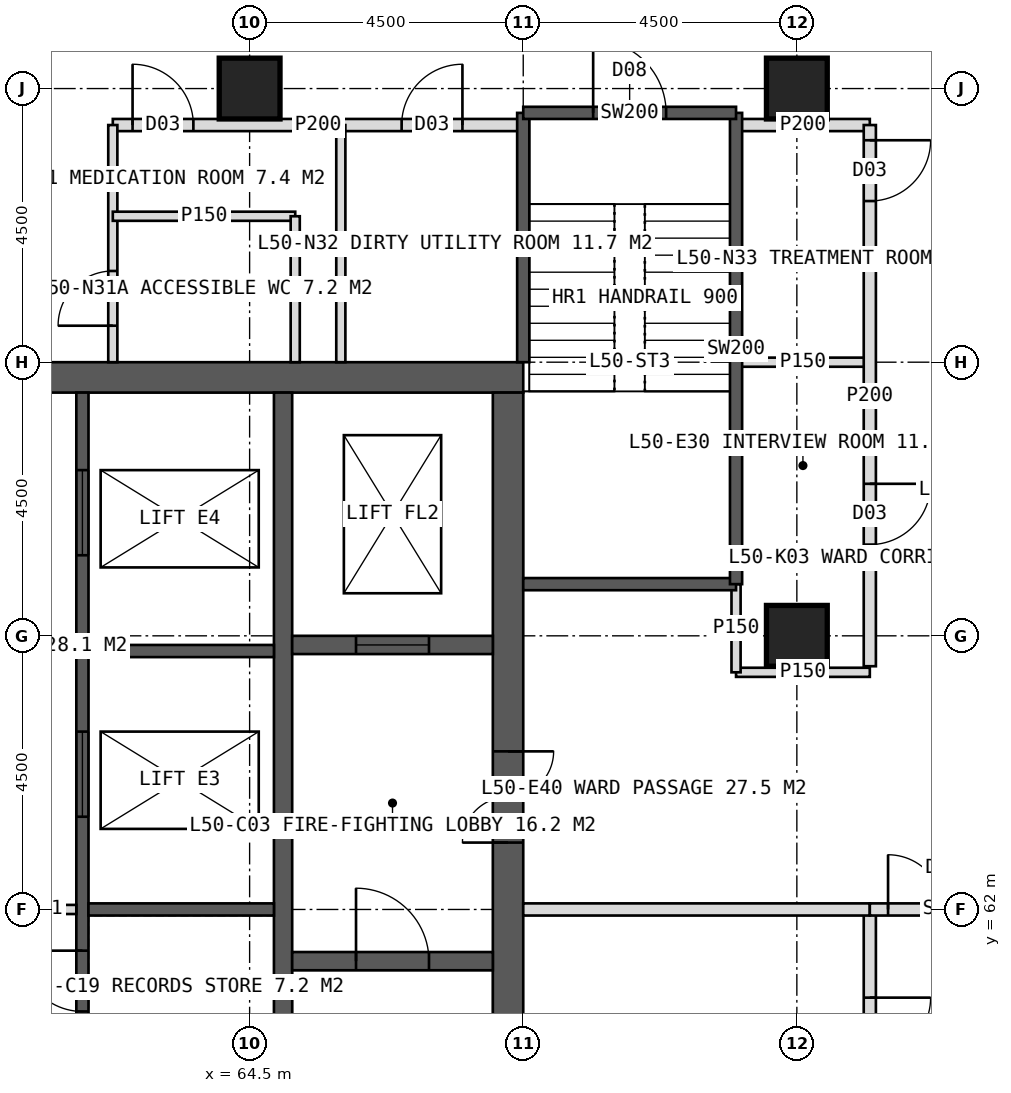
"""IFC4 building model, lengths in metres.
Left out: names, types, materials, properties, quantities, classifications, styles, units other than length and angle.
Written with IfcOpenShell. Run it as: python <this file> out.ifc"""

import sys

from ifc_helpers import new_model, si_unit, direction, frame, frame_2d, origin, origin_2d, place, context, subcontext, project, spatial, rectangle, hollow_rectangle, extrude, element, fill, save


model = new_model("IFC4")
c1 = context("Model", 3, precision=1e-05, world=origin(), true_north=direction((0.0, 1.0)))
c2 = subcontext(c1, "Body", "Model", "MODEL_VIEW")
j1 = project(units=[si_unit("LENGTHUNIT", "METRE"), si_unit("PLANEANGLEUNIT", "RADIAN")], contexts=[c1])
p1 = place(None, origin())
s1 = spatial("IfcSite", under=j1, at=p1, CompositionType="ELEMENT")
p2 = place(p1, origin())
s2 = spatial("IfcBuilding", under=s1, at=p2, CompositionType="ELEMENT")
p3 = place(p2, frame((0.0, 0.0, 209.0)))
s3 = spatial("IfcBuildingStorey", under=s2, at=p3, CompositionType="ELEMENT", Elevation=209.0)
p4 = place(p3, frame((51.0, 70.75, 0.0), z_axis=(0.0, 0.0, 1.0), x_axis=(1.0, 0.0, 0.0)))
e1 = element("IfcWall", 1, at=p4, inside=s3, PredefinedType="SHEAR", context=c2, shape_type="SweptSolid", body=[
    extrude(rectangle(XDim=18.0, YDim=0.5, at=frame_2d((9.0, 0.0))), origin(), (0.0, 0.0, 1.0), 4.0),
])
p5 = place(p4, frame((8.1, 0.0, 0.0)))
e2 = element("IfcOpeningElement", 2, at=p5, cuts=e1, PredefinedType="OPENING", context=c2, shape_type="SweptSolid", body=[
    extrude(rectangle(XDim=1.8, YDim=2.2, at=frame_2d((0.9, 1.1))), frame((0.0, 0.26, 0.0), z_axis=(0.0, -1.0, 0.0), x_axis=(1.0, 0.0, 0.0)), (0.0, 0.0, 1.0), 0.52),
])
p6 = place(p3, frame((68.75, 53.5, 0.0), z_axis=(0.0, 0.0, 1.0), x_axis=(0.0, 1.0, 0.0)))
e3 = element("IfcWall", 3, at=p6, inside=s3, PredefinedType="SHEAR", context=c2, shape_type="SweptSolid", body=[
    extrude(rectangle(XDim=17.0, YDim=0.5, at=frame_2d((8.5, 0.0))), origin(), (0.0, 0.0, 1.0), 4.0),
])
p7 = place(p6, frame((9.6, 0.0, 0.0)))
e4 = element("IfcOpeningElement", 4, at=p7, cuts=e3, PredefinedType="OPENING", context=c2, shape_type="SweptSolid", body=[
    extrude(rectangle(XDim=1.5, YDim=2.2, at=frame_2d((0.75, 1.1))), frame((0.0, 0.26, 0.0), z_axis=(0.0, -1.0, 0.0), x_axis=(1.0, 0.0, 0.0)), (0.0, 0.0, 1.0), 0.52),
])
p8 = place(p3, frame((65.05, 53.5, 0.0), z_axis=(0.0, 0.0, 1.0), x_axis=(0.0, 1.0, 0.0)))
e5 = element("IfcWall", 5, at=p8, inside=s3, PredefinedType="SHEAR", context=c2, shape_type="SweptSolid", body=[
    extrude(rectangle(XDim=17.0, YDim=0.3, at=frame_2d((8.5, 0.0))), origin(), (0.0, 0.0, 1.0), 4.0),
])
p9 = place(p3, frame((61.75, 53.5, 0.0), z_axis=(0.0, 0.0, 1.0), x_axis=(0.0, 1.0, 0.0)))
e6 = element("IfcWall", 6, at=p9, inside=s3, PredefinedType="SHEAR", context=c2, shape_type="SweptSolid", body=[
    extrude(rectangle(XDim=17.0, YDim=0.2, at=frame_2d((8.5, 0.0))), origin(), (0.0, 0.0, 1.0), 4.0),
])
p10 = place(p9, frame((0.808, 0.0, 0.0)))
e7 = element("IfcOpeningElement", 7, at=p10, cuts=e6, PredefinedType="OPENING", context=c2, shape_type="SweptSolid", body=[
    extrude(rectangle(XDim=1.0, YDim=2.1, at=frame_2d((0.5, 1.05))), frame((0.0, 0.11, 0.0), z_axis=(0.0, -1.0, 0.0), x_axis=(1.0, 0.0, 0.0)), (0.0, 0.0, 1.0), 0.22),
])
p11 = place(p9, frame((2.958, 0.0, 0.0)))
e8 = element("IfcOpeningElement", 8, at=p11, cuts=e6, PredefinedType="OPENING", context=c2, shape_type="SweptSolid", body=[
    extrude(rectangle(XDim=1.0, YDim=2.1, at=frame_2d((0.5, 1.05))), frame((0.0, 0.11, 0.0), z_axis=(0.0, -1.0, 0.0), x_axis=(1.0, 0.0, 0.0)), (0.0, 0.0, 1.0), 0.22),
])
p12 = place(p9, frame((4.722, 0.0, 0.0)))
e9 = element("IfcOpeningElement", 9, at=p12, cuts=e6, PredefinedType="OPENING", context=c2, shape_type="SweptSolid", body=[
    extrude(rectangle(XDim=1.0, YDim=2.1, at=frame_2d((0.5, 1.05))), frame((0.0, 0.11, 0.0), z_axis=(0.0, -1.0, 0.0), x_axis=(1.0, 0.0, 0.0)), (0.0, 0.0, 1.0), 0.22),
])
p13 = place(p9, frame((6.823, 0.0, 0.0)))
e10 = element("IfcOpeningElement", 10, at=p13, cuts=e6, PredefinedType="OPENING", context=c2, shape_type="SweptSolid", body=[
    extrude(rectangle(XDim=1.0, YDim=2.1, at=frame_2d((0.5, 1.05))), frame((0.0, 0.11, 0.0), z_axis=(0.0, -1.0, 0.0), x_axis=(1.0, 0.0, 0.0)), (0.0, 0.0, 1.0), 0.22),
])
p14 = place(p9, frame((10.025, 0.0, 0.0)))
e11 = element("IfcOpeningElement", 11, at=p14, cuts=e6, PredefinedType="OPENING", context=c2, shape_type="SweptSolid", body=[
    extrude(rectangle(XDim=1.4, YDim=2.2, at=frame_2d((0.7, 1.1))), frame((0.0, 0.11, 0.0), z_axis=(0.0, -1.0, 0.0), x_axis=(1.0, 0.0, 0.0)), (0.0, 0.0, 1.0), 0.22),
])
p15 = place(p9, frame((14.325, 0.0, 0.0)))
e12 = element("IfcOpeningElement", 12, at=p15, cuts=e6, PredefinedType="OPENING", context=c2, shape_type="SweptSolid", body=[
    extrude(rectangle(XDim=1.4, YDim=2.2, at=frame_2d((0.7, 1.1))), frame((0.0, 0.11, 0.0), z_axis=(0.0, -1.0, 0.0), x_axis=(1.0, 0.0, 0.0)), (0.0, 0.0, 1.0), 0.22),
])
for number, where, z_axis, x_axis in (
    (13, (61.85, 62.0, 0.0), (0.0, 0.0, 1.0), (1.0, 0.0, 0.0)),
    (14, (61.85, 66.25, 0.0), (0.0, 0.0, 1.0), (1.0, 0.0, 0.0)),
):
    element("IfcWall", number, at=place(p3, frame(where, z_axis=z_axis, x_axis=x_axis)), inside=s3, PredefinedType="SHEAR", context=c2, shape_type="SweptSolid", body=[
        extrude(rectangle(XDim=3.05, YDim=0.2, at=frame_2d((1.525, 0.0))), origin(), (0.0, 0.0, 1.0), 4.0),
    ])
p16 = place(p3, frame((65.2, 61.15, 0.0), z_axis=(0.0, 0.0, 1.0), x_axis=(1.0, 0.0, 0.0)))
e15 = element("IfcWall", 15, at=p16, inside=s3, PredefinedType="SHEAR", context=c2, shape_type="SweptSolid", body=[
    extrude(rectangle(XDim=3.3, YDim=0.3, at=frame_2d((1.65, 0.0))), origin(), (0.0, 0.0, 1.0), 4.0),
])
p17 = place(p16, frame((1.05, 0.0, 0.0)))
e16 = element("IfcOpeningElement", 16, at=p17, cuts=e15, PredefinedType="OPENING", context=c2, shape_type="SweptSolid", body=[
    extrude(rectangle(XDim=1.2, YDim=2.1, at=frame_2d((0.6, 1.05))), frame((0.0, 0.16, 0.0), z_axis=(0.0, -1.0, 0.0), x_axis=(1.0, 0.0, 0.0)), (0.0, 0.0, 1.0), 0.32),
])
p18 = place(p3, frame((65.2, 66.35, 0.0), z_axis=(0.0, 0.0, 1.0), x_axis=(1.0, 0.0, 0.0)))
e17 = element("IfcWall", 17, at=p18, inside=s3, PredefinedType="SHEAR", context=c2, shape_type="SweptSolid", body=[
    extrude(rectangle(XDim=3.3, YDim=0.3, at=frame_2d((1.65, 0.0))), origin(), (0.0, 0.0, 1.0), 4.0),
])
p19 = place(p18, frame((1.05, 0.0, 0.0)))
e18 = element("IfcOpeningElement", 18, at=p19, cuts=e17, PredefinedType="OPENING", context=c2, shape_type="SweptSolid", body=[
    extrude(rectangle(XDim=1.2, YDim=2.2, at=frame_2d((0.6, 1.1))), frame((0.0, 0.16, 0.0), z_axis=(0.0, -1.0, 0.0), x_axis=(1.0, 0.0, 0.0)), (0.0, 0.0, 1.0), 0.32),
])
for number, where, z_axis, x_axis in (
    (19, (73.5, 75.5, 0.0), (0.0, 0.0, 1.0), (1.0, 0.0, 0.0)),
    (20, (64.5, 75.5, 0.0), (0.0, 0.0, 1.0), (1.0, 0.0, 0.0)),
    (21, (73.5, 66.5, 0.0), (0.0, 0.0, 1.0), (1.0, 0.0, 0.0)),
):
    element("IfcColumn", number, at=place(p3, frame(where, z_axis=z_axis, x_axis=x_axis)), inside=s3, PredefinedType="COLUMN", context=c2, shape_type="SweptSolid", body=[
        extrude(hollow_rectangle(XDim=1.0, YDim=1.0, WallThickness=0.1, at=origin_2d()), origin(), (0.0, 0.0, 1.0), 4.0),
    ])
p20 = place(p3, frame((62.25, 74.9, 0.0), z_axis=(0.0, 0.0, 1.0), x_axis=(1.0, 0.0, 0.0)))
e22 = element("IfcWall", 22, at=p20, inside=s3, PredefinedType="PARTITIONING", context=c2, shape_type="SweptSolid", body=[
    extrude(rectangle(XDim=6.75, YDim=0.2, at=frame_2d((3.375, 0.0))), origin(), (0.0, 0.0, 1.0), 3.75),
])
p21 = place(p20, frame((0.325, 0.0, 0.0)))
e23 = element("IfcOpeningElement", 23, at=p21, cuts=e22, PredefinedType="OPENING", context=c2, shape_type="SweptSolid", body=[
    extrude(rectangle(XDim=1.0, YDim=2.1, at=frame_2d((0.5, 1.05))), frame((0.0, 0.11, 0.0), z_axis=(0.0, -1.0, 0.0), x_axis=(1.0, 0.0, 0.0)), (0.0, 0.0, 1.0), 0.22),
])
p22 = place(p20, frame((4.75, 0.0, 0.0)))
e24 = element("IfcOpeningElement", 24, at=p22, cuts=e22, PredefinedType="OPENING", context=c2, shape_type="SweptSolid", body=[
    extrude(rectangle(XDim=1.0, YDim=2.1, at=frame_2d((0.5, 1.05))), frame((0.0, 0.11, 0.0), z_axis=(0.0, -1.0, 0.0), x_axis=(1.0, 0.0, 0.0)), (0.0, 0.0, 1.0), 0.22),
])
p23 = place(p3, frame((72.5, 74.9, 0.0), z_axis=(0.0, 0.0, 1.0), x_axis=(1.0, 0.0, 0.0)))
e25 = element("IfcWall", 25, at=p23, inside=s3, PredefinedType="PARTITIONING", context=c2, shape_type="SweptSolid", body=[
    extrude(rectangle(XDim=2.2, YDim=0.2, at=frame_2d((1.1, 0.0))), origin(), (0.0, 0.0, 1.0), 3.75),
])
p24 = place(p3, frame((62.25, 71.0, 0.0), z_axis=(0.0, 0.0, 1.0), x_axis=(0.0, 1.0, 0.0)))
e26 = element("IfcWall", 26, at=p24, inside=s3, PredefinedType="PARTITIONING", context=c2, shape_type="SweptSolid", body=[
    extrude(rectangle(XDim=3.9, YDim=0.15, at=frame_2d((1.95, 0.0))), origin(), (0.0, 0.0, 1.0), 3.75),
])
p25 = place(p24, frame((0.6, 0.0, 0.0)))
e27 = element("IfcOpeningElement", 27, at=p25, cuts=e26, PredefinedType="OPENING", context=c2, shape_type="SweptSolid", body=[
    extrude(rectangle(XDim=0.9, YDim=2.1, at=frame_2d((0.45, 1.05))), frame((0.0, 0.085, 0.0), z_axis=(0.0, -1.0, 0.0), x_axis=(1.0, 0.0, 0.0)), (0.0, 0.0, 1.0), 0.17),
])
p26 = place(p3, frame((66.0, 71.0, 0.0), z_axis=(0.0, 0.0, 1.0), x_axis=(0.0, 1.0, 0.0)))
e28 = element("IfcWall", 28, at=p26, inside=s3, PredefinedType="PARTITIONING", context=c2, shape_type="SweptSolid", body=[
    extrude(rectangle(XDim=3.9, YDim=0.15, at=frame_2d((1.95, 0.0))), origin(), (0.0, 0.0, 1.0), 3.75),
])
p27 = place(p3, frame((62.25, 73.4, 0.0), z_axis=(0.0, 0.0, 1.0), x_axis=(1.0, 0.0, 0.0)))
e29 = element("IfcWall", 29, at=p27, inside=s3, PredefinedType="PARTITIONING", context=c2, shape_type="SweptSolid", body=[
    extrude(rectangle(XDim=3.0, YDim=0.15, at=frame_2d((1.5, 0.0))), origin(), (0.0, 0.0, 1.0), 3.75),
])
p28 = place(p3, frame((65.25, 71.0, 0.0), z_axis=(0.0, 0.0, 1.0), x_axis=(0.0, 1.0, 0.0)))
e30 = element("IfcWall", 30, at=p28, inside=s3, PredefinedType="PARTITIONING", context=c2, shape_type="SweptSolid", body=[
    extrude(rectangle(XDim=2.4, YDim=0.15, at=frame_2d((1.2, 0.0))), origin(), (0.0, 0.0, 1.0), 3.75),
])
p29 = place(p3, frame((72.5, 71.0, 0.0), z_axis=(0.0, 0.0, 1.0), x_axis=(1.0, 0.0, 0.0)))
e31 = element("IfcWall", 31, at=p29, inside=s3, PredefinedType="PARTITIONING", context=c2, shape_type="SweptSolid", body=[
    extrude(rectangle(XDim=2.2, YDim=0.15, at=frame_2d((1.1, 0.0))), origin(), (0.0, 0.0, 1.0), 3.75),
])
p30 = place(p3, frame((74.7, 74.9, 0.0), z_axis=(0.0, 0.0, 1.0), x_axis=(0.0, -1.0, 0.0)))
e32 = element("IfcWall", 32, at=p30, inside=s3, PredefinedType="PARTITIONING", context=c2, shape_type="SweptSolid", body=[
    extrude(rectangle(XDim=8.9, YDim=0.2, at=frame_2d((4.45, 0.0))), origin(), (0.0, 0.0, 1.0), 3.75),
])
p31 = place(p30, frame((0.25, 0.0, 0.0)))
e33 = element("IfcOpeningElement", 33, at=p31, cuts=e32, PredefinedType="OPENING", context=c2, shape_type="SweptSolid", body=[
    extrude(rectangle(XDim=1.0, YDim=2.1, at=frame_2d((0.5, 1.05))), frame((0.0, 0.11, 0.0), z_axis=(0.0, -1.0, 0.0), x_axis=(1.0, 0.0, 0.0)), (0.0, 0.0, 1.0), 0.22),
])
p32 = place(p30, frame((5.9, 0.0, 0.0)))
e34 = element("IfcOpeningElement", 34, at=p32, cuts=e32, PredefinedType="OPENING", context=c2, shape_type="SweptSolid", body=[
    extrude(rectangle(XDim=1.0, YDim=2.1, at=frame_2d((0.5, 1.05))), frame((0.0, 0.11, 0.0), z_axis=(0.0, -1.0, 0.0), x_axis=(1.0, 0.0, 0.0)), (0.0, 0.0, 1.0), 0.22),
])
p33 = place(p3, frame((74.7, 62.0, 0.0), z_axis=(0.0, 0.0, 1.0), x_axis=(0.0, -1.0, 0.0)))
e35 = element("IfcWall", 35, at=p33, inside=s3, PredefinedType="PARTITIONING", context=c2, shape_type="SweptSolid", body=[
    extrude(rectangle(XDim=14.7, YDim=0.2, at=frame_2d((7.35, 0.0))), origin(), (0.0, 0.0, 1.0), 3.75),
])
p34 = place(p33, frame((1.45, 0.0, 0.0)))
e36 = element("IfcOpeningElement", 36, at=p34, cuts=e35, PredefinedType="OPENING", context=c2, shape_type="SweptSolid", body=[
    extrude(rectangle(XDim=1.0, YDim=2.1, at=frame_2d((0.5, 1.05))), frame((0.0, 0.11, 0.0), z_axis=(0.0, -1.0, 0.0), x_axis=(1.0, 0.0, 0.0)), (0.0, 0.0, 1.0), 0.22),
])
p35 = place(p33, frame((11.35, 0.0, 0.0)))
e37 = element("IfcOpeningElement", 37, at=p35, cuts=e35, PredefinedType="OPENING", context=c2, shape_type="SweptSolid", body=[
    extrude(rectangle(XDim=1.0, YDim=2.1, at=frame_2d((0.5, 1.05))), frame((0.0, 0.11, 0.0), z_axis=(0.0, -1.0, 0.0), x_axis=(1.0, 0.0, 0.0)), (0.0, 0.0, 1.0), 0.22),
])
p36 = place(p3, frame((72.5, 65.9, 0.0), z_axis=(0.0, 0.0, 1.0), x_axis=(1.0, 0.0, 0.0)))
e38 = element("IfcWall", 38, at=p36, inside=s3, PredefinedType="PARTITIONING", context=c2, shape_type="SweptSolid", body=[
    extrude(rectangle(XDim=2.2, YDim=0.15, at=frame_2d((1.1, 0.0))), origin(), (0.0, 0.0, 1.0), 3.75),
])
p37 = place(p3, frame((69.0, 62.0, 0.0), z_axis=(0.0, 0.0, 1.0), x_axis=(1.0, 0.0, 0.0)))
e39 = element("IfcWall", 39, at=p37, inside=s3, PredefinedType="SOLIDWALL", context=c2, shape_type="SweptSolid", body=[
    extrude(rectangle(XDim=5.7, YDim=0.2, at=frame_2d((2.85, 0.0))), origin(), (0.0, 0.0, 1.0), 2.95),
])
p38 = place(p3, frame((74.7, 62.0, 0.0), z_axis=(0.0, 0.0, 1.0), x_axis=(1.0, 0.0, 0.0)))
e40 = element("IfcWall", 40, at=p38, inside=s3, PredefinedType="SOLIDWALL", context=c2, shape_type="SweptSolid", body=[
    extrude(rectangle(XDim=2.7, YDim=0.2, at=frame_2d((1.35, 0.0))), origin(), (0.0, 0.0, 1.0), 2.95),
])
p39 = place(p38, frame((0.3, 0.0, 0.0)))
e41 = element("IfcOpeningElement", 41, at=p39, cuts=e40, PredefinedType="OPENING", context=c2, shape_type="SweptSolid", body=[
    extrude(rectangle(XDim=1.8, YDim=2.2, at=frame_2d((0.9, 1.1))), frame((0.0, 0.11, 0.0), z_axis=(0.0, -1.0, 0.0), x_axis=(1.0, 0.0, 0.0)), (0.0, 0.0, 1.0), 0.22),
])
p40 = place(p3, frame((58.35, 62.0, 0.0), z_axis=(0.0, 0.0, 1.0), x_axis=(1.0, 0.0, 0.0)))
e42 = element("IfcWall", 42, at=p40, inside=s3, PredefinedType="PARTITIONING", context=c2, shape_type="SweptSolid", body=[
    extrude(rectangle(XDim=3.3, YDim=0.15, at=frame_2d((1.65, 0.0))), origin(), (0.0, 0.0, 1.0), 3.75),
])
p41 = place(p3, frame((72.5, 65.9, 0.0), z_axis=(0.0, 0.0, 1.0), x_axis=(0.0, 1.0, 0.0)))
e43 = element("IfcWall", 43, at=p41, inside=s3, PredefinedType="PARTITIONING", context=c2, shape_type="SweptSolid", body=[
    extrude(rectangle(XDim=1.45, YDim=0.15, at=frame_2d((0.725, 0.0))), origin(), (0.0, 0.0, 1.0), 3.75),
])
p42 = place(p3, frame((69.0, 71.0, 0.0), z_axis=(0.0, 0.0, 1.0), x_axis=(0.0, 1.0, 0.0)))
e44 = element("IfcWall", 44, at=p42, inside=s3, PredefinedType="SOLIDWALL", context=c2, shape_type="SweptSolid", body=[
    extrude(rectangle(XDim=4.1, YDim=0.2, at=frame_2d((2.05, 0.0))), origin(), (0.0, 0.0, 1.0), 3.75),
])
p43 = place(p3, frame((69.0, 67.35, 0.0), z_axis=(0.0, 0.0, 1.0), x_axis=(1.0, 0.0, 0.0)))
e45 = element("IfcWall", 45, at=p43, inside=s3, PredefinedType="SOLIDWALL", context=c2, shape_type="SweptSolid", body=[
    extrude(rectangle(XDim=3.5, YDim=0.2, at=frame_2d((1.75, 0.0))), origin(), (0.0, 0.0, 1.0), 3.75),
])
p44 = place(p3, frame((72.5, 67.35, 0.0), z_axis=(0.0, 0.0, 1.0), x_axis=(0.0, 1.0, 0.0)))
e46 = element("IfcWall", 46, at=p44, inside=s3, PredefinedType="SOLIDWALL", context=c2, shape_type="SweptSolid", body=[
    extrude(rectangle(XDim=7.75, YDim=0.2, at=frame_2d((3.875, 0.0))), origin(), (0.0, 0.0, 1.0), 3.75),
])
p45 = place(p3, frame((69.0, 75.1, 0.0), z_axis=(0.0, 0.0, 1.0), x_axis=(1.0, 0.0, 0.0)))
e47 = element("IfcWall", 47, at=p45, inside=s3, PredefinedType="SOLIDWALL", context=c2, shape_type="SweptSolid", body=[
    extrude(rectangle(XDim=3.5, YDim=0.2, at=frame_2d((1.75, 0.0))), origin(), (0.0, 0.0, 1.0), 3.75),
])
p46 = place(p45, frame((1.15, 0.0, 0.0)))
e48 = element("IfcOpeningElement", 48, at=p46, cuts=e47, PredefinedType="OPENING", context=c2, shape_type="SweptSolid", body=[
    extrude(rectangle(XDim=1.2, YDim=2.1, at=frame_2d((0.6, 1.05))), frame((0.0, 0.11, 0.0), z_axis=(0.0, -1.0, 0.0), x_axis=(1.0, 0.0, 0.0)), (0.0, 0.0, 1.0), 0.22),
])
p47 = place(p25, origin())
e49 = element("IfcDoor", 49, at=p47, inside=s3, OperationType="SINGLE_SWING_LEFT", PredefinedType="DOOR", context=c2, shape_type="SweptSolid", body=[
    extrude(rectangle(XDim=0.9, YDim=2.1, at=frame_2d((0.45, 1.05))), frame((0.0, 0.025, 0.0), z_axis=(0.0, -1.0, 0.0), x_axis=(1.0, 0.0, 0.0)), (0.0, 0.0, 1.0), 0.05),
])
fill(e27, e49)
p48 = place(p21, origin())
e50 = element("IfcDoor", 50, at=p48, inside=s3, OperationType="SINGLE_SWING_LEFT", PredefinedType="DOOR", context=c2, shape_type="SweptSolid", body=[
    extrude(rectangle(XDim=1.0, YDim=2.1, at=frame_2d((0.5, 1.05))), frame((0.0, 0.025, 0.0), z_axis=(0.0, -1.0, 0.0), x_axis=(1.0, 0.0, 0.0)), (0.0, 0.0, 1.0), 0.05),
])
fill(e23, e50)
p49 = place(p22, origin())
e51 = element("IfcDoor", 51, at=p49, inside=s3, OperationType="SINGLE_SWING_RIGHT", PredefinedType="DOOR", context=c2, shape_type="SweptSolid", body=[
    extrude(rectangle(XDim=1.0, YDim=2.1, at=frame_2d((0.5, 1.05))), frame((0.0, 0.025, 0.0), z_axis=(0.0, -1.0, 0.0), x_axis=(1.0, 0.0, 0.0)), (0.0, 0.0, 1.0), 0.05),
])
fill(e24, e51)
p50 = place(p31, origin())
e52 = element("IfcDoor", 52, at=p50, inside=s3, OperationType="SINGLE_SWING_LEFT", PredefinedType="DOOR", context=c2, shape_type="SweptSolid", body=[
    extrude(rectangle(XDim=1.0, YDim=2.1, at=frame_2d((0.5, 1.05))), frame((0.0, 0.025, 0.0), z_axis=(0.0, -1.0, 0.0), x_axis=(1.0, 0.0, 0.0)), (0.0, 0.0, 1.0), 0.05),
])
fill(e33, e52)
p51 = place(p32, origin())
e53 = element("IfcDoor", 53, at=p51, inside=s3, OperationType="SINGLE_SWING_LEFT", PredefinedType="DOOR", context=c2, shape_type="SweptSolid", body=[
    extrude(rectangle(XDim=1.0, YDim=2.1, at=frame_2d((0.5, 1.05))), frame((0.0, 0.025, 0.0), z_axis=(0.0, -1.0, 0.0), x_axis=(1.0, 0.0, 0.0)), (0.0, 0.0, 1.0), 0.05),
])
fill(e34, e53)
p52 = place(p34, origin())
e54 = element("IfcDoor", 54, at=p52, inside=s3, OperationType="SINGLE_SWING_LEFT", PredefinedType="DOOR", context=c2, shape_type="SweptSolid", body=[
    extrude(rectangle(XDim=1.0, YDim=2.1, at=frame_2d((0.5, 1.05))), frame((0.0, 0.025, 0.0), z_axis=(0.0, -1.0, 0.0), x_axis=(1.0, 0.0, 0.0)), (0.0, 0.0, 1.0), 0.05),
])
fill(e36, e54)
p53 = place(p39, origin())
e55 = element("IfcDoor", 55, at=p53, inside=s3, OperationType="DOUBLE_DOOR_DOUBLE_SWING", PredefinedType="DOOR", context=c2, shape_type="SweptSolid", body=[
    extrude(rectangle(XDim=1.8, YDim=2.2, at=frame_2d((0.9, 1.1))), frame((0.0, 0.025, 0.0), z_axis=(0.0, -1.0, 0.0), x_axis=(1.0, 0.0, 0.0)), (0.0, 0.0, 1.0), 0.05),
])
fill(e41, e55)
p54 = place(p7, origin())
e56 = element("IfcDoor", 56, at=p54, inside=s3, OperationType="DOUBLE_DOOR_SINGLE_SWING", PredefinedType="DOOR", context=c2, shape_type="SweptSolid", body=[
    extrude(rectangle(XDim=1.5, YDim=2.2, at=frame_2d((0.75, 1.1))), frame((0.0, 0.025, 0.0), z_axis=(0.0, -1.0, 0.0), x_axis=(1.0, 0.0, 0.0)), (0.0, 0.0, 1.0), 0.05),
])
fill(e4, e56)
p55 = place(p17, origin())
e57 = element("IfcDoor", 57, at=p55, inside=s3, OperationType="SINGLE_SWING_LEFT", PredefinedType="DOOR", context=c2, shape_type="SweptSolid", body=[
    extrude(rectangle(XDim=1.2, YDim=2.1, at=frame_2d((0.6, 1.05))), frame((0.0, 0.025, 0.0), z_axis=(0.0, -1.0, 0.0), x_axis=(1.0, 0.0, 0.0)), (0.0, 0.0, 1.0), 0.05),
])
fill(e16, e57)
p56 = place(p19, origin())
e58 = element("IfcDoor", 58, at=p56, inside=s3, OperationType="SLIDING_TO_LEFT", PredefinedType="DOOR", context=c2, shape_type="SweptSolid", body=[
    extrude(rectangle(XDim=1.2, YDim=2.2, at=frame_2d((0.6, 1.1))), frame((0.0, 0.025, 0.0), z_axis=(0.0, -1.0, 0.0), x_axis=(1.0, 0.0, 0.0)), (0.0, 0.0, 1.0), 0.05),
])
fill(e18, e58)
p57 = place(p13, origin())
e59 = element("IfcDoor", 59, at=p57, inside=s3, OperationType="SINGLE_SWING_RIGHT", PredefinedType="DOOR", context=c2, shape_type="SweptSolid", body=[
    extrude(rectangle(XDim=1.0, YDim=2.1, at=frame_2d((0.5, 1.05))), frame((0.0, 0.025, 0.0), z_axis=(0.0, -1.0, 0.0), x_axis=(1.0, 0.0, 0.0)), (0.0, 0.0, 1.0), 0.05),
])
fill(e10, e59)
p58 = place(p14, origin())
e60 = element("IfcDoor", 60, at=p58, inside=s3, OperationType="SLIDING_TO_LEFT", PredefinedType="DOOR", context=c2, shape_type="SweptSolid", body=[
    extrude(rectangle(XDim=1.4, YDim=2.2, at=frame_2d((0.7, 1.1))), frame((0.0, 0.025, 0.0), z_axis=(0.0, -1.0, 0.0), x_axis=(1.0, 0.0, 0.0)), (0.0, 0.0, 1.0), 0.05),
])
fill(e11, e60)
p59 = place(p15, origin())
e61 = element("IfcDoor", 61, at=p59, inside=s3, OperationType="SLIDING_TO_LEFT", PredefinedType="DOOR", context=c2, shape_type="SweptSolid", body=[
    extrude(rectangle(XDim=1.4, YDim=2.2, at=frame_2d((0.7, 1.1))), frame((0.0, 0.025, 0.0), z_axis=(0.0, -1.0, 0.0), x_axis=(1.0, 0.0, 0.0)), (0.0, 0.0, 1.0), 0.05),
])
fill(e12, e61)
p60 = place(p46, origin())
e62 = element("IfcDoor", 62, at=p60, inside=s3, OperationType="SINGLE_SWING_LEFT", PredefinedType="DOOR", context=c2, shape_type="SweptSolid", body=[
    extrude(rectangle(XDim=1.2, YDim=2.1, at=frame_2d((0.6, 1.05))), frame((0.0, 0.025, 0.0), z_axis=(0.0, -1.0, 0.0), x_axis=(1.0, 0.0, 0.0)), (0.0, 0.0, 1.0), 0.05),
])
fill(e48, e62)
save(model, sys.argv[1])
